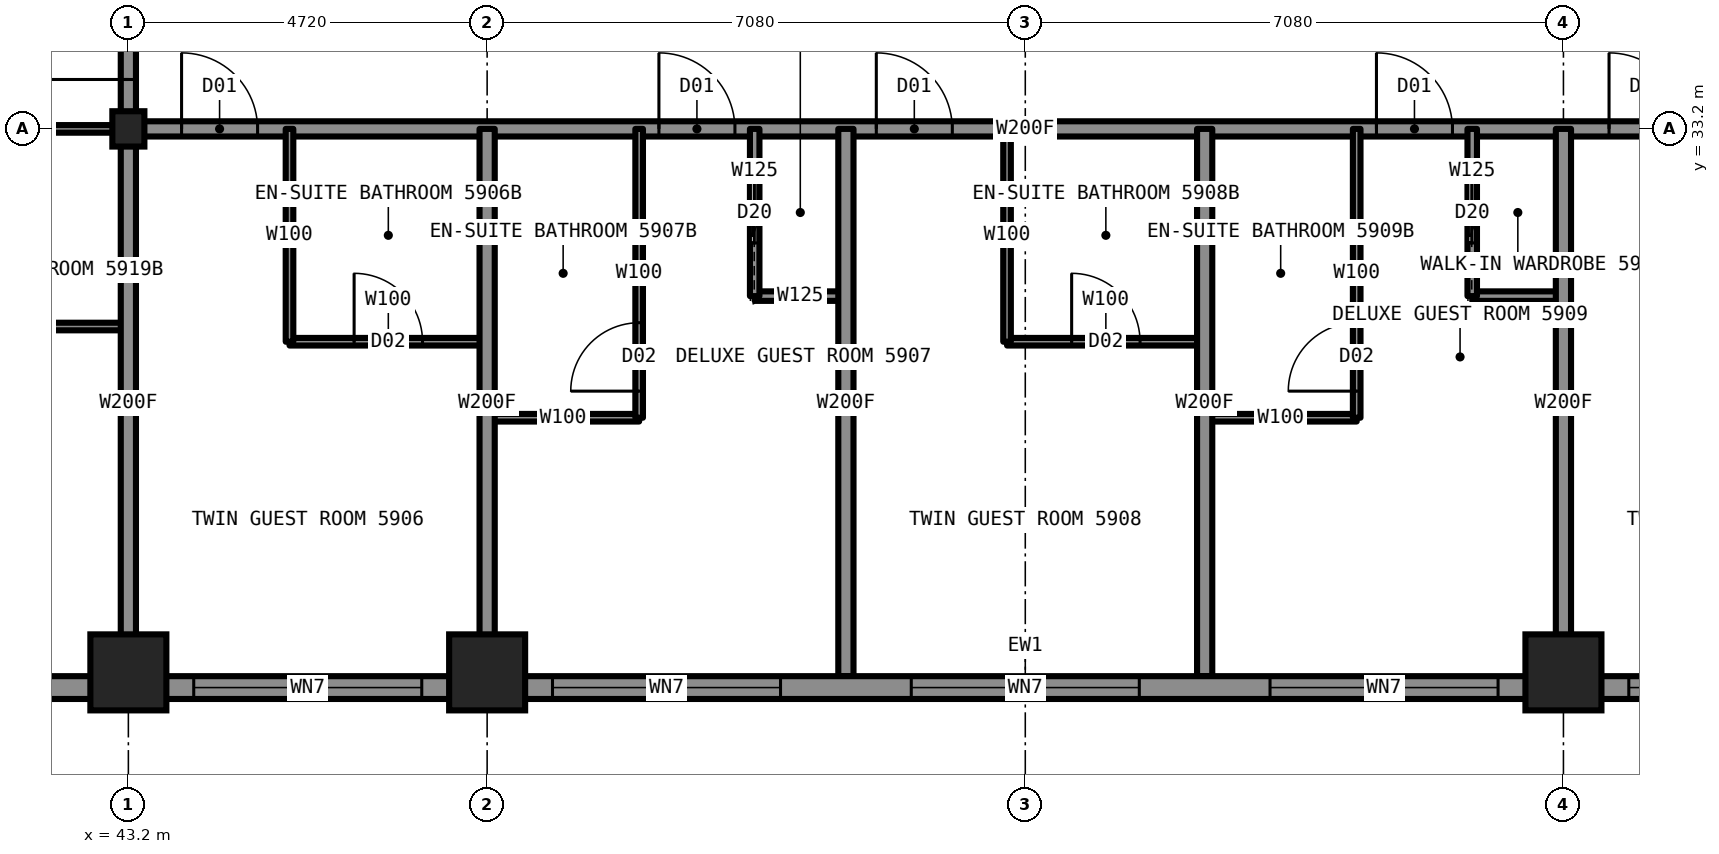
"""IFC4 building model, lengths in metres.
Left out: names, types, materials, properties, quantities, classifications, styles, units other than length and angle.
Written with IfcOpenShell. Run it as: python <this file> out.ifc"""

import sys

from ifc_helpers import new_model, si_unit, direction, frame, frame_2d, origin, origin_2d, place, context, subcontext, project, spatial, rectangle, i_section, extrude, element, fill, save


model = new_model("IFC4")
c1 = context("Model", 3, precision=1e-05, world=origin(), true_north=direction((0.0, 1.0)))
c2 = subcontext(c1, "Body", "Model", "MODEL_VIEW")
j1 = project(units=[si_unit("LENGTHUNIT", "METRE"), si_unit("PLANEANGLEUNIT", "RADIAN")], contexts=[c1])
p1 = place(None, origin())
s1 = spatial("IfcSite", under=j1, at=p1, CompositionType="ELEMENT")
p2 = place(p1, origin())
s2 = spatial("IfcBuilding", under=s1, at=p2, CompositionType="ELEMENT")
p3 = place(p2, frame((0.0, 0.0, 214.3)))
s3 = spatial("IfcBuildingStorey", under=s2, at=p3, CompositionType="ELEMENT", Elevation=214.3)
for number, where, z_axis, x_axis in (
    (1, (43.2, 26.05, 0.0), (0.0, 0.0, 1.0), (1.0, 0.0, 0.0)),
    (2, (47.92, 26.05, 0.0), (0.0, 0.0, 1.0), (1.0, 0.0, 0.0)),
    (3, (62.08, 26.05, 0.0), (0.0, 0.0, 1.0), (1.0, 0.0, 0.0)),
):
    element("IfcColumn", number, at=place(p3, frame(where, z_axis=z_axis, x_axis=x_axis)), inside=s3, PredefinedType="COLUMN", context=c2, shape_type="SweptSolid", body=[
        extrude(i_section(OverallWidth=0.411, OverallDepth=0.434, WebThickness=0.036, FlangeThickness=0.057, at=origin_2d()), origin(), (0.0, 0.0, 1.0), 3.5),
    ])
p4 = place(p3, frame((43.2, 33.2, 0.0), z_axis=(0.0, 0.0, 1.0), x_axis=(1.0, 0.0, 0.0)))
e4 = element("IfcColumn", 4, at=p4, inside=s3, PredefinedType="COLUMN", context=c2, shape_type="SweptSolid", body=[
    extrude(i_section(OverallWidth=0.422, OverallDepth=0.465, WebThickness=0.045, FlangeThickness=0.073, at=origin_2d()), origin(), (0.0, 0.0, 1.0), 3.5),
])
p5 = place(p3, frame((40.6, 33.2, 0.0), z_axis=(0.0, 0.0, 1.0), x_axis=(1.0, 0.0, 0.0)))
e5 = element("IfcWall", 5, at=p5, inside=s3, PredefinedType="PARTITIONING", context=c2, shape_type="SweptSolid", body=[
    extrude(rectangle(XDim=2.6, YDim=0.1, at=frame_2d((1.3, 0.0))), origin(), (0.0, 0.0, 1.0), 2.573),
])
p6 = place(p3, frame((43.2, 33.2, 0.0), z_axis=(0.0, 0.0, 1.0), x_axis=(1.0, 0.0, 0.0)))
e6 = element("IfcWall", 6, at=p6, inside=s3, PredefinedType="PARTITIONING", context=c2, shape_type="SweptSolid", body=[
    extrude(rectangle(XDim=23.6, YDim=0.2, at=frame_2d((11.8, 0.0))), origin(), (0.0, 0.0, 1.0), 3.33),
])
p7 = place(p6, frame((0.7, 0.0, 0.0)))
e7 = element("IfcOpeningElement", 7, at=p7, cuts=e6, PredefinedType="OPENING", context=c2, shape_type="SweptSolid", body=[
    extrude(rectangle(XDim=1.0, YDim=2.2, at=frame_2d((0.5, 1.1))), frame((0.0, 0.11, 0.0), z_axis=(0.0, -1.0, 0.0), x_axis=(1.0, 0.0, 0.0)), (0.0, 0.0, 1.0), 0.22),
])
p8 = place(p6, frame((6.98, 0.0, 0.0)))
e8 = element("IfcOpeningElement", 8, at=p8, cuts=e6, PredefinedType="OPENING", context=c2, shape_type="SweptSolid", body=[
    extrude(rectangle(XDim=1.0, YDim=2.2, at=frame_2d((0.5, 1.1))), frame((0.0, 0.11, 0.0), z_axis=(0.0, -1.0, 0.0), x_axis=(1.0, 0.0, 0.0)), (0.0, 0.0, 1.0), 0.22),
])
p9 = place(p6, frame((9.84, 0.0, 0.0)))
e9 = element("IfcOpeningElement", 9, at=p9, cuts=e6, PredefinedType="OPENING", context=c2, shape_type="SweptSolid", body=[
    extrude(rectangle(XDim=1.0, YDim=2.2, at=frame_2d((0.5, 1.1))), frame((0.0, 0.11, 0.0), z_axis=(0.0, -1.0, 0.0), x_axis=(1.0, 0.0, 0.0)), (0.0, 0.0, 1.0), 0.22),
])
p10 = place(p6, frame((16.42, 0.0, 0.0)))
e10 = element("IfcOpeningElement", 10, at=p10, cuts=e6, PredefinedType="OPENING", context=c2, shape_type="SweptSolid", body=[
    extrude(rectangle(XDim=1.0, YDim=2.2, at=frame_2d((0.5, 1.1))), frame((0.0, 0.11, 0.0), z_axis=(0.0, -1.0, 0.0), x_axis=(1.0, 0.0, 0.0)), (0.0, 0.0, 1.0), 0.22),
])
p11 = place(p6, frame((19.28, 0.0, 0.0)))
e11 = element("IfcOpeningElement", 11, at=p11, cuts=e6, PredefinedType="OPENING", context=c2, shape_type="SweptSolid", body=[
    extrude(rectangle(XDim=1.0, YDim=2.2, at=frame_2d((0.5, 1.1))), frame((0.0, 0.11, 0.0), z_axis=(0.0, -1.0, 0.0), x_axis=(1.0, 0.0, 0.0)), (0.0, 0.0, 1.0), 0.22),
])
p12 = place(p3, frame((51.44, 31.0, 0.0), z_axis=(0.0, 0.0, 1.0), x_axis=(1.0, 0.0, 0.0)))
e12 = element("IfcWall", 12, at=p12, inside=s3, PredefinedType="PARTITIONING", context=c2, shape_type="SweptSolid", body=[
    extrude(rectangle(XDim=1.2, YDim=0.125, at=frame_2d((0.6, 0.0))), origin(), (0.0, 0.0, 1.0), 3.33),
])
p13 = place(p3, frame((60.88, 31.0, 0.0), z_axis=(0.0, 0.0, 1.0), x_axis=(1.0, 0.0, 0.0)))
e13 = element("IfcWall", 13, at=p13, inside=s3, PredefinedType="PARTITIONING", context=c2, shape_type="SweptSolid", body=[
    extrude(rectangle(XDim=1.2, YDim=0.125, at=frame_2d((0.6, 0.0))), origin(), (0.0, 0.0, 1.0), 3.33),
])
p14 = place(p3, frame((40.6, 30.6, 0.0), z_axis=(0.0, 0.0, 1.0), x_axis=(1.0, 0.0, 0.0)))
e14 = element("IfcWall", 14, at=p14, inside=s3, PredefinedType="PARTITIONING", context=c2, shape_type="SweptSolid", body=[
    extrude(rectangle(XDim=2.6, YDim=0.1, at=frame_2d((1.3, 0.0))), origin(), (0.0, 0.0, 1.0), 3.33),
])
p15 = place(p3, frame((45.32, 30.4, 0.0), z_axis=(0.0, 0.0, 1.0), x_axis=(1.0, 0.0, 0.0)))
e15 = element("IfcWall", 15, at=p15, inside=s3, PredefinedType="PARTITIONING", context=c2, shape_type="SweptSolid", body=[
    extrude(rectangle(XDim=2.6, YDim=0.1, at=frame_2d((1.3, 0.0))), origin(), (0.0, 0.0, 1.0), 3.33),
])
p16 = place(p15, frame((0.85, 0.0, 0.0)))
e16 = element("IfcOpeningElement", 16, at=p16, cuts=e15, PredefinedType="OPENING", context=c2, shape_type="SweptSolid", body=[
    extrude(rectangle(XDim=0.9, YDim=2.1, at=frame_2d((0.45, 1.05))), frame((0.0, 0.06, 0.0), z_axis=(0.0, -1.0, 0.0), x_axis=(1.0, 0.0, 0.0)), (0.0, 0.0, 1.0), 0.12),
])
p17 = place(p3, frame((54.76, 30.4, 0.0), z_axis=(0.0, 0.0, 1.0), x_axis=(1.0, 0.0, 0.0)))
e17 = element("IfcWall", 17, at=p17, inside=s3, PredefinedType="PARTITIONING", context=c2, shape_type="SweptSolid", body=[
    extrude(rectangle(XDim=2.6, YDim=0.1, at=frame_2d((1.3, 0.0))), origin(), (0.0, 0.0, 1.0), 3.33),
])
p18 = place(p17, frame((0.85, 0.0, 0.0)))
e18 = element("IfcOpeningElement", 18, at=p18, cuts=e17, PredefinedType="OPENING", context=c2, shape_type="SweptSolid", body=[
    extrude(rectangle(XDim=0.9, YDim=2.1, at=frame_2d((0.45, 1.05))), frame((0.0, 0.06, 0.0), z_axis=(0.0, -1.0, 0.0), x_axis=(1.0, 0.0, 0.0)), (0.0, 0.0, 1.0), 0.12),
])
for number, where, z_axis, x_axis in (
    (19, (47.92, 29.4, 0.0), (0.0, 0.0, 1.0), (1.0, 0.0, 0.0)),
    (20, (57.36, 29.4, 0.0), (0.0, 0.0, 1.0), (1.0, 0.0, 0.0)),
):
    element("IfcWall", number, at=place(p3, frame(where, z_axis=z_axis, x_axis=x_axis)), inside=s3, PredefinedType="PARTITIONING", context=c2, shape_type="SweptSolid", body=[
        extrude(rectangle(XDim=2.0, YDim=0.1, at=frame_2d((1.0, 0.0))), origin(), (0.0, 0.0, 1.0), 3.33),
    ])
p19 = place(p3, frame((54.76, 30.4, 0.0), z_axis=(0.0, 0.0, 1.0), x_axis=(0.0, 1.0, 0.0)))
e21 = element("IfcWall", 21, at=p19, inside=s3, PredefinedType="PARTITIONING", context=c2, shape_type="SweptSolid", body=[
    extrude(rectangle(XDim=2.8, YDim=0.1, at=frame_2d((1.4, 0.0))), origin(), (0.0, 0.0, 1.0), 3.33),
])
p20 = place(p3, frame((43.2, 33.2, 0.0), z_axis=(0.0, 0.0, 1.0), x_axis=(0.0, 1.0, 0.0)))
e22 = element("IfcWall", 22, at=p20, inside=s3, PredefinedType="PARTITIONING", context=c2, shape_type="SweptSolid", body=[
    extrude(rectangle(XDim=4.72, YDim=0.2, at=frame_2d((2.36, 0.0))), origin(), (0.0, 0.0, 1.0), 3.33),
])
p21 = place(p20, frame((0.65, 0.0, 0.0)))
e23 = element("IfcOpeningElement", 23, at=p21, cuts=e22, PredefinedType="OPENING", context=c2, shape_type="SweptSolid", body=[
    extrude(rectangle(XDim=1.1, YDim=2.2, at=frame_2d((0.55, 1.1))), frame((0.0, 0.11, 0.0), z_axis=(0.0, -1.0, 0.0), x_axis=(1.0, 0.0, 0.0)), (0.0, 0.0, 1.0), 0.22),
])
p22 = place(p3, frame((43.2, 26.0, 0.0), z_axis=(0.0, 0.0, 1.0), x_axis=(0.0, 1.0, 0.0)))
e24 = element("IfcWall", 24, at=p22, inside=s3, PredefinedType="PARTITIONING", context=c2, shape_type="SweptSolid", body=[
    extrude(rectangle(XDim=7.2, YDim=0.2, at=frame_2d((3.6, 0.0))), origin(), (0.0, 0.0, 1.0), 2.573),
])
p23 = place(p3, frame((52.64, 26.0, 0.0), z_axis=(0.0, 0.0, 1.0), x_axis=(0.0, 1.0, 0.0)))
e25 = element("IfcWall", 25, at=p23, inside=s3, PredefinedType="PARTITIONING", context=c2, shape_type="SweptSolid", body=[
    extrude(rectangle(XDim=7.2, YDim=0.2, at=frame_2d((3.6, 0.0))), origin(), (0.0, 0.0, 1.0), 3.33),
])
p24 = place(p3, frame((51.44, 31.0, 0.0), z_axis=(0.0, 0.0, 1.0), x_axis=(0.0, 1.0, 0.0)))
e26 = element("IfcWall", 26, at=p24, inside=s3, PredefinedType="PARTITIONING", context=c2, shape_type="SweptSolid", body=[
    extrude(rectangle(XDim=2.2, YDim=0.125, at=frame_2d((1.1, 0.0))), origin(), (0.0, 0.0, 1.0), 3.33),
])
p25 = place(p24, frame((0.7, 0.0, 0.0)))
e27 = element("IfcOpeningElement", 27, at=p25, cuts=e26, PredefinedType="OPENING", context=c2, shape_type="SweptSolid", body=[
    extrude(rectangle(XDim=0.8, YDim=2.1, at=frame_2d((0.4, 1.05))), frame((0.0, 0.073, 0.0), z_axis=(0.0, -1.0, 0.0), x_axis=(1.0, 0.0, 0.0)), (0.0, 0.0, 1.0), 0.145),
])
p26 = place(p3, frame((49.92, 29.4, 0.0), z_axis=(0.0, 0.0, 1.0), x_axis=(0.0, 1.0, 0.0)))
e28 = element("IfcWall", 28, at=p26, inside=s3, PredefinedType="PARTITIONING", context=c2, shape_type="SweptSolid", body=[
    extrude(rectangle(XDim=3.8, YDim=0.1, at=frame_2d((1.9, 0.0))), origin(), (0.0, 0.0, 1.0), 3.33),
])
p27 = place(p26, frame((0.35, 0.0, 0.0)))
e29 = element("IfcOpeningElement", 29, at=p27, cuts=e28, PredefinedType="OPENING", context=c2, shape_type="SweptSolid", body=[
    extrude(rectangle(XDim=0.9, YDim=2.1, at=frame_2d((0.45, 1.05))), frame((0.0, 0.06, 0.0), z_axis=(0.0, -1.0, 0.0), x_axis=(1.0, 0.0, 0.0)), (0.0, 0.0, 1.0), 0.12),
])
p28 = place(p3, frame((47.92, 26.0, 0.0), z_axis=(0.0, 0.0, 1.0), x_axis=(0.0, 1.0, 0.0)))
e30 = element("IfcWall", 30, at=p28, inside=s3, PredefinedType="PARTITIONING", context=c2, shape_type="SweptSolid", body=[
    extrude(rectangle(XDim=7.2, YDim=0.2, at=frame_2d((3.6, 0.0))), origin(), (0.0, 0.0, 1.0), 2.573),
])
p29 = place(p3, frame((45.32, 30.4, 0.0), z_axis=(0.0, 0.0, 1.0), x_axis=(0.0, 1.0, 0.0)))
e31 = element("IfcWall", 31, at=p29, inside=s3, PredefinedType="PARTITIONING", context=c2, shape_type="SweptSolid", body=[
    extrude(rectangle(XDim=2.8, YDim=0.1, at=frame_2d((1.4, 0.0))), origin(), (0.0, 0.0, 1.0), 3.33),
])
p30 = place(p3, frame((57.36, 26.0, 0.0), z_axis=(0.0, 0.0, 1.0), x_axis=(0.0, 1.0, 0.0)))
e32 = element("IfcWall", 32, at=p30, inside=s3, PredefinedType="PARTITIONING", context=c2, shape_type="SweptSolid", body=[
    extrude(rectangle(XDim=7.2, YDim=0.2, at=frame_2d((3.6, 0.0))), origin(), (0.0, 0.0, 1.0), 3.33),
])
p31 = place(p3, frame((59.36, 29.4, 0.0), z_axis=(0.0, 0.0, 1.0), x_axis=(0.0, 1.0, 0.0)))
e33 = element("IfcWall", 33, at=p31, inside=s3, PredefinedType="PARTITIONING", context=c2, shape_type="SweptSolid", body=[
    extrude(rectangle(XDim=3.8, YDim=0.1, at=frame_2d((1.9, 0.0))), origin(), (0.0, 0.0, 1.0), 3.33),
])
p32 = place(p31, frame((0.35, 0.0, 0.0)))
e34 = element("IfcOpeningElement", 34, at=p32, cuts=e33, PredefinedType="OPENING", context=c2, shape_type="SweptSolid", body=[
    extrude(rectangle(XDim=0.9, YDim=2.1, at=frame_2d((0.45, 1.05))), frame((0.0, 0.06, 0.0), z_axis=(0.0, -1.0, 0.0), x_axis=(1.0, 0.0, 0.0)), (0.0, 0.0, 1.0), 0.12),
])
p33 = place(p3, frame((60.88, 31.0, 0.0), z_axis=(0.0, 0.0, 1.0), x_axis=(0.0, 1.0, 0.0)))
e35 = element("IfcWall", 35, at=p33, inside=s3, PredefinedType="PARTITIONING", context=c2, shape_type="SweptSolid", body=[
    extrude(rectangle(XDim=2.2, YDim=0.125, at=frame_2d((1.1, 0.0))), origin(), (0.0, 0.0, 1.0), 3.33),
])
p34 = place(p33, frame((0.7, 0.0, 0.0)))
e36 = element("IfcOpeningElement", 36, at=p34, cuts=e35, PredefinedType="OPENING", context=c2, shape_type="SweptSolid", body=[
    extrude(rectangle(XDim=0.8, YDim=2.1, at=frame_2d((0.4, 1.05))), frame((0.0, 0.073, 0.0), z_axis=(0.0, -1.0, 0.0), x_axis=(1.0, 0.0, 0.0)), (0.0, 0.0, 1.0), 0.145),
])
p35 = place(p3, frame((62.08, 26.0, 0.0), z_axis=(0.0, 0.0, 1.0), x_axis=(0.0, 1.0, 0.0)))
e37 = element("IfcWall", 37, at=p35, inside=s3, PredefinedType="PARTITIONING", context=c2, shape_type="SweptSolid", body=[
    extrude(rectangle(XDim=7.2, YDim=0.2, at=frame_2d((3.6, 0.0))), origin(), (0.0, 0.0, 1.0), 2.573),
])
p36 = place(p3, frame((41.2, 25.85, 0.0), z_axis=(0.0, 0.0, 1.0), x_axis=(1.0, 0.0, 0.0)))
e38 = element("IfcWall", 38, at=p36, inside=s3, PredefinedType="SOLIDWALL", context=c2, shape_type="SweptSolid", body=[
    extrude(rectangle(XDim=27.6, YDim=0.3, at=frame_2d((13.8, 0.0))), origin(), (0.0, 0.0, 1.0), 2.63),
])
p37 = place(p36, frame((2.86, 0.0, 0.3)))
e39 = element("IfcOpeningElement", 39, at=p37, cuts=e38, PredefinedType="OPENING", context=c2, shape_type="SweptSolid", body=[
    extrude(rectangle(XDim=3.0, YDim=2.0, at=frame_2d((1.5, 1.0))), frame((0.0, 0.16, 0.0), z_axis=(0.0, -1.0, 0.0), x_axis=(1.0, 0.0, 0.0)), (0.0, 0.0, 1.0), 0.32),
])
p38 = place(p36, frame((7.58, 0.0, 0.3)))
e40 = element("IfcOpeningElement", 40, at=p38, cuts=e38, PredefinedType="OPENING", context=c2, shape_type="SweptSolid", body=[
    extrude(rectangle(XDim=3.0, YDim=2.0, at=frame_2d((1.5, 1.0))), frame((0.0, 0.16, 0.0), z_axis=(0.0, -1.0, 0.0), x_axis=(1.0, 0.0, 0.0)), (0.0, 0.0, 1.0), 0.32),
])
p39 = place(p36, frame((12.3, 0.0, 0.3)))
e41 = element("IfcOpeningElement", 41, at=p39, cuts=e38, PredefinedType="OPENING", context=c2, shape_type="SweptSolid", body=[
    extrude(rectangle(XDim=3.0, YDim=2.0, at=frame_2d((1.5, 1.0))), frame((0.0, 0.16, 0.0), z_axis=(0.0, -1.0, 0.0), x_axis=(1.0, 0.0, 0.0)), (0.0, 0.0, 1.0), 0.32),
])
p40 = place(p36, frame((17.02, 0.0, 0.3)))
e42 = element("IfcOpeningElement", 42, at=p40, cuts=e38, PredefinedType="OPENING", context=c2, shape_type="SweptSolid", body=[
    extrude(rectangle(XDim=3.0, YDim=2.0, at=frame_2d((1.5, 1.0))), frame((0.0, 0.16, 0.0), z_axis=(0.0, -1.0, 0.0), x_axis=(1.0, 0.0, 0.0)), (0.0, 0.0, 1.0), 0.32),
])
p41 = place(p36, frame((21.74, 0.0, 0.3)))
e43 = element("IfcOpeningElement", 43, at=p41, cuts=e38, PredefinedType="OPENING", context=c2, shape_type="SweptSolid", body=[
    extrude(rectangle(XDim=3.0, YDim=2.0, at=frame_2d((1.5, 1.0))), frame((0.0, 0.16, 0.0), z_axis=(0.0, -1.0, 0.0), x_axis=(1.0, 0.0, 0.0)), (0.0, 0.0, 1.0), 0.32),
])
p42 = place(p7, origin())
e44 = element("IfcDoor", 44, at=p42, inside=s3, OperationType="SINGLE_SWING_LEFT", PredefinedType="DOOR", context=c2, shape_type="SweptSolid", body=[
    extrude(rectangle(XDim=1.0, YDim=2.2, at=frame_2d((0.5, 1.1))), frame((0.0, 0.025, 0.0), z_axis=(0.0, -1.0, 0.0), x_axis=(1.0, 0.0, 0.0)), (0.0, 0.0, 1.0), 0.05),
])
fill(e7, e44)
p43 = place(p16, origin())
e45 = element("IfcDoor", 45, at=p43, inside=s3, OperationType="SINGLE_SWING_RIGHT", PredefinedType="DOOR", context=c2, shape_type="SweptSolid", body=[
    extrude(rectangle(XDim=0.9, YDim=2.1, at=frame_2d((0.45, 1.05))), frame((0.0, 0.025, 0.0), z_axis=(0.0, -1.0, 0.0), x_axis=(1.0, 0.0, 0.0)), (0.0, 0.0, 1.0), 0.05),
])
fill(e16, e45)
p44 = place(p8, origin())
e46 = element("IfcDoor", 46, at=p44, inside=s3, OperationType="SINGLE_SWING_LEFT", PredefinedType="DOOR", context=c2, shape_type="SweptSolid", body=[
    extrude(rectangle(XDim=1.0, YDim=2.2, at=frame_2d((0.5, 1.1))), frame((0.0, 0.025, 0.0), z_axis=(0.0, -1.0, 0.0), x_axis=(1.0, 0.0, 0.0)), (0.0, 0.0, 1.0), 0.05),
])
fill(e8, e46)
p45 = place(p27, origin())
e47 = element("IfcDoor", 47, at=p45, inside=s3, OperationType="SINGLE_SWING_RIGHT", PredefinedType="DOOR", context=c2, shape_type="SweptSolid", body=[
    extrude(rectangle(XDim=0.9, YDim=2.1, at=frame_2d((0.45, 1.05))), frame((0.0, 0.025, 0.0), z_axis=(0.0, -1.0, 0.0), x_axis=(1.0, 0.0, 0.0)), (0.0, 0.0, 1.0), 0.05),
])
fill(e29, e47)
p46 = place(p25, origin())
e48 = element("IfcDoor", 48, at=p46, inside=s3, OperationType="SLIDING_TO_LEFT", PredefinedType="DOOR", context=c2, shape_type="SweptSolid", body=[
    extrude(rectangle(XDim=0.8, YDim=2.1, at=frame_2d((0.4, 1.05))), frame((0.0, 0.025, 0.0), z_axis=(0.0, -1.0, 0.0), x_axis=(1.0, 0.0, 0.0)), (0.0, 0.0, 1.0), 0.05),
])
fill(e27, e48)
p47 = place(p9, origin())
e49 = element("IfcDoor", 49, at=p47, inside=s3, OperationType="SINGLE_SWING_LEFT", PredefinedType="DOOR", context=c2, shape_type="SweptSolid", body=[
    extrude(rectangle(XDim=1.0, YDim=2.2, at=frame_2d((0.5, 1.1))), frame((0.0, 0.025, 0.0), z_axis=(0.0, -1.0, 0.0), x_axis=(1.0, 0.0, 0.0)), (0.0, 0.0, 1.0), 0.05),
])
fill(e9, e49)
p48 = place(p18, origin())
e50 = element("IfcDoor", 50, at=p48, inside=s3, OperationType="SINGLE_SWING_RIGHT", PredefinedType="DOOR", context=c2, shape_type="SweptSolid", body=[
    extrude(rectangle(XDim=0.9, YDim=2.1, at=frame_2d((0.45, 1.05))), frame((0.0, 0.025, 0.0), z_axis=(0.0, -1.0, 0.0), x_axis=(1.0, 0.0, 0.0)), (0.0, 0.0, 1.0), 0.05),
])
fill(e18, e50)
p49 = place(p10, origin())
e51 = element("IfcDoor", 51, at=p49, inside=s3, OperationType="SINGLE_SWING_LEFT", PredefinedType="DOOR", context=c2, shape_type="SweptSolid", body=[
    extrude(rectangle(XDim=1.0, YDim=2.2, at=frame_2d((0.5, 1.1))), frame((0.0, 0.025, 0.0), z_axis=(0.0, -1.0, 0.0), x_axis=(1.0, 0.0, 0.0)), (0.0, 0.0, 1.0), 0.05),
])
fill(e10, e51)
p50 = place(p32, origin())
e52 = element("IfcDoor", 52, at=p50, inside=s3, OperationType="SINGLE_SWING_RIGHT", PredefinedType="DOOR", context=c2, shape_type="SweptSolid", body=[
    extrude(rectangle(XDim=0.9, YDim=2.1, at=frame_2d((0.45, 1.05))), frame((0.0, 0.025, 0.0), z_axis=(0.0, -1.0, 0.0), x_axis=(1.0, 0.0, 0.0)), (0.0, 0.0, 1.0), 0.05),
])
fill(e34, e52)
p51 = place(p34, origin())
e53 = element("IfcDoor", 53, at=p51, inside=s3, OperationType="SLIDING_TO_LEFT", PredefinedType="DOOR", context=c2, shape_type="SweptSolid", body=[
    extrude(rectangle(XDim=0.8, YDim=2.1, at=frame_2d((0.4, 1.05))), frame((0.0, 0.025, 0.0), z_axis=(0.0, -1.0, 0.0), x_axis=(1.0, 0.0, 0.0)), (0.0, 0.0, 1.0), 0.05),
])
fill(e36, e53)
p52 = place(p11, origin())
e54 = element("IfcDoor", 54, at=p52, inside=s3, OperationType="SINGLE_SWING_LEFT", PredefinedType="DOOR", context=c2, shape_type="SweptSolid", body=[
    extrude(rectangle(XDim=1.0, YDim=2.2, at=frame_2d((0.5, 1.1))), frame((0.0, 0.025, 0.0), z_axis=(0.0, -1.0, 0.0), x_axis=(1.0, 0.0, 0.0)), (0.0, 0.0, 1.0), 0.05),
])
fill(e11, e54)
p53 = place(p21, origin())
e55 = element("IfcDoor", 55, at=p53, inside=s3, OperationType="SINGLE_SWING_LEFT", PredefinedType="DOOR", context=c2, shape_type="SweptSolid", body=[
    extrude(rectangle(XDim=1.1, YDim=2.2, at=frame_2d((0.55, 1.1))), frame((0.0, 0.025, 0.0), z_axis=(0.0, -1.0, 0.0), x_axis=(1.0, 0.0, 0.0)), (0.0, 0.0, 1.0), 0.05),
])
fill(e23, e55)
p54 = place(p37, origin())
e56 = element("IfcWindow", 56, at=p54, inside=s3, PartitioningType="SINGLE_PANEL", PredefinedType="WINDOW", context=c2, shape_type="SweptSolid", body=[
    extrude(rectangle(XDim=3.0, YDim=2.0, at=frame_2d((1.5, 1.0))), frame((0.0, 0.13, 0.0), z_axis=(0.0, -1.0, 0.0), x_axis=(1.0, 0.0, 0.0)), (0.0, 0.0, 1.0), 0.06),
])
fill(e39, e56)
p55 = place(p38, origin())
e57 = element("IfcWindow", 57, at=p55, inside=s3, PartitioningType="SINGLE_PANEL", PredefinedType="WINDOW", context=c2, shape_type="SweptSolid", body=[
    extrude(rectangle(XDim=3.0, YDim=2.0, at=frame_2d((1.5, 1.0))), frame((0.0, 0.13, 0.0), z_axis=(0.0, -1.0, 0.0), x_axis=(1.0, 0.0, 0.0)), (0.0, 0.0, 1.0), 0.06),
])
fill(e40, e57)
p56 = place(p39, origin())
e58 = element("IfcWindow", 58, at=p56, inside=s3, PartitioningType="SINGLE_PANEL", PredefinedType="WINDOW", context=c2, shape_type="SweptSolid", body=[
    extrude(rectangle(XDim=3.0, YDim=2.0, at=frame_2d((1.5, 1.0))), frame((0.0, 0.13, 0.0), z_axis=(0.0, -1.0, 0.0), x_axis=(1.0, 0.0, 0.0)), (0.0, 0.0, 1.0), 0.06),
])
fill(e41, e58)
p57 = place(p40, origin())
e59 = element("IfcWindow", 59, at=p57, inside=s3, PartitioningType="SINGLE_PANEL", PredefinedType="WINDOW", context=c2, shape_type="SweptSolid", body=[
    extrude(rectangle(XDim=3.0, YDim=2.0, at=frame_2d((1.5, 1.0))), frame((0.0, 0.13, 0.0), z_axis=(0.0, -1.0, 0.0), x_axis=(1.0, 0.0, 0.0)), (0.0, 0.0, 1.0), 0.06),
])
fill(e42, e59)
p58 = place(p41, origin())
e60 = element("IfcWindow", 60, at=p58, inside=s3, PartitioningType="SINGLE_PANEL", PredefinedType="WINDOW", context=c2, shape_type="SweptSolid", body=[
    extrude(rectangle(XDim=3.0, YDim=2.0, at=frame_2d((1.5, 1.0))), frame((0.0, 0.13, 0.0), z_axis=(0.0, -1.0, 0.0), x_axis=(1.0, 0.0, 0.0)), (0.0, 0.0, 1.0), 0.06),
])
fill(e43, e60)
save(model, sys.argv[1])
